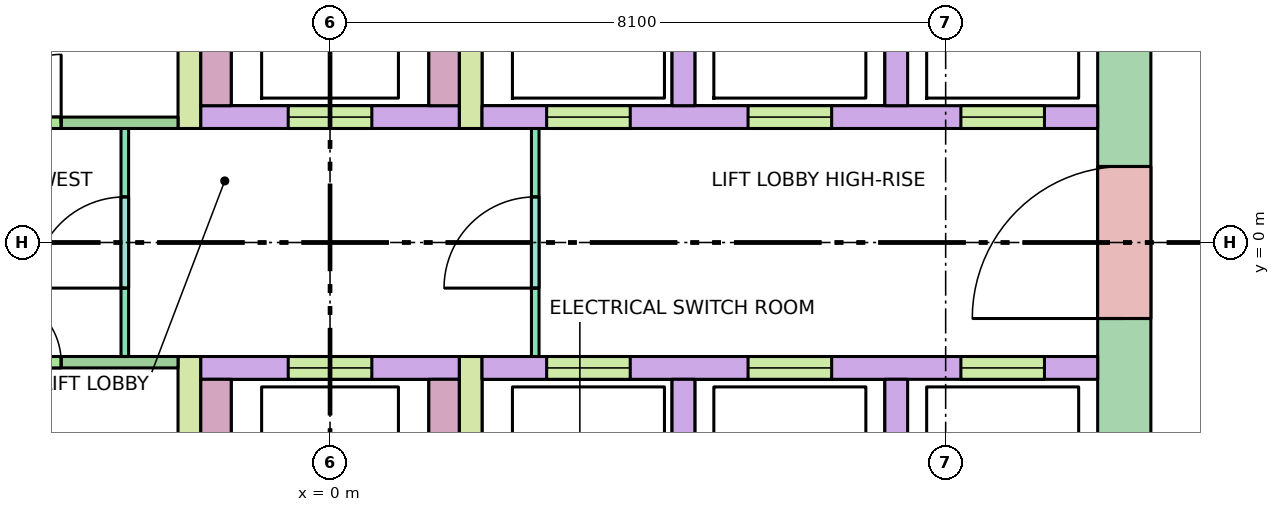
"""IFC4 building model, lengths in metres.
Left out: names, types, materials, properties, quantities, classifications, styles, units other than length and angle.
Written with IfcOpenShell. Run it as: python <this file> out.ifc"""

import sys

from ifc_helpers import new_model, si_unit, direction, frame, frame_2d, origin, place, context, subcontext, project, spatial, rectangle, extrude, element, fill, save


model = new_model("IFC4")
c1 = context("Model", 3, precision=1e-05, world=origin(), true_north=direction((0.0, 1.0)))
c2 = subcontext(c1, "Body", "Model", "MODEL_VIEW")
j1 = project(units=[si_unit("LENGTHUNIT", "METRE"), si_unit("PLANEANGLEUNIT", "RADIAN")], contexts=[c1])
p1 = place(None, origin())
s1 = spatial("IfcSite", under=j1, at=p1, CompositionType="ELEMENT")
p2 = place(p1, origin())
s2 = spatial("IfcBuilding", under=s1, at=p2, CompositionType="ELEMENT")
p3 = place(p2, frame((0.0, 0.0, 248.3)))
s3 = spatial("IfcBuildingStorey", under=s2, at=p3, CompositionType="ELEMENT", Elevation=248.3)
p4 = place(p3, frame((10.45, -5.13, -0.28), z_axis=(0.0, 0.0, 1.0), x_axis=(0.0, 1.0, 0.0)))
e1 = element("IfcWall", 1, at=p4, inside=s3, PredefinedType="SHEAR", context=c2, shape_type="SweptSolid", body=[
    extrude(rectangle(XDim=10.26, YDim=0.7, at=frame_2d((5.13, 0.0))), origin(), (0.0, 0.0, 1.0), 5.5),
])
p5 = place(p4, frame((4.13, 0.0, 0.28)))
e2 = element("IfcOpeningElement", 2, at=p5, cuts=e1, PredefinedType="OPENING", context=c2, shape_type="SweptSolid", body=[
    extrude(rectangle(XDim=2.0, YDim=2.1, at=frame_2d((1.0, 1.05))), frame((0.0, 0.36, 0.0), z_axis=(0.0, -1.0, 0.0), x_axis=(1.0, 0.0, 0.0)), (0.0, 0.0, 1.0), 0.72),
])
p6 = place(p3, frame((2.0, 1.65, 0.0), z_axis=(0.0, 0.0, 1.0), x_axis=(1.0, 0.0, 0.0)))
e3 = element("IfcWall", 3, at=p6, inside=s3, PredefinedType="SOLIDWALL", context=c2, shape_type="SweptSolid", body=[
    extrude(rectangle(XDim=8.1, YDim=0.3, at=frame_2d((4.05, 0.0))), origin(), (0.0, 0.0, 1.0), 5.22),
])
p7 = place(p6, frame((0.85, 0.0, 0.0)))
e4 = element("IfcOpeningElement", 4, at=p7, cuts=e3, PredefinedType="OPENING", context=c2, shape_type="SweptSolid", body=[
    extrude(rectangle(XDim=1.1, YDim=2.1, at=frame_2d((0.55, 1.05))), frame((0.0, 0.16, 0.0), z_axis=(0.0, -1.0, 0.0), x_axis=(1.0, 0.0, 0.0)), (0.0, 0.0, 1.0), 0.32),
])
p8 = place(p6, frame((3.5, 0.0, 0.0)))
e5 = element("IfcOpeningElement", 5, at=p8, cuts=e3, PredefinedType="OPENING", context=c2, shape_type="SweptSolid", body=[
    extrude(rectangle(XDim=1.1, YDim=2.1, at=frame_2d((0.55, 1.05))), frame((0.0, 0.16, 0.0), z_axis=(0.0, -1.0, 0.0), x_axis=(1.0, 0.0, 0.0)), (0.0, 0.0, 1.0), 0.32),
])
p9 = place(p6, frame((6.3, 0.0, 0.0)))
e6 = element("IfcOpeningElement", 6, at=p9, cuts=e3, PredefinedType="OPENING", context=c2, shape_type="SweptSolid", body=[
    extrude(rectangle(XDim=1.1, YDim=2.1, at=frame_2d((0.55, 1.05))), frame((0.0, 0.16, 0.0), z_axis=(0.0, -1.0, 0.0), x_axis=(1.0, 0.0, 0.0)), (0.0, 0.0, 1.0), 0.32),
])
p10 = place(p3, frame((2.0, -1.65, 0.0), z_axis=(0.0, 0.0, 1.0), x_axis=(1.0, 0.0, 0.0)))
e7 = element("IfcWall", 7, at=p10, inside=s3, PredefinedType="SOLIDWALL", context=c2, shape_type="SweptSolid", body=[
    extrude(rectangle(XDim=8.1, YDim=0.3, at=frame_2d((4.05, 0.0))), origin(), (0.0, 0.0, 1.0), 5.22),
])
p11 = place(p10, frame((0.85, 0.0, 0.0)))
e8 = element("IfcOpeningElement", 8, at=p11, cuts=e7, PredefinedType="OPENING", context=c2, shape_type="SweptSolid", body=[
    extrude(rectangle(XDim=1.1, YDim=2.1, at=frame_2d((0.55, 1.05))), frame((0.0, 0.16, 0.0), z_axis=(0.0, -1.0, 0.0), x_axis=(1.0, 0.0, 0.0)), (0.0, 0.0, 1.0), 0.32),
])
p12 = place(p10, frame((3.5, 0.0, 0.0)))
e9 = element("IfcOpeningElement", 9, at=p12, cuts=e7, PredefinedType="OPENING", context=c2, shape_type="SweptSolid", body=[
    extrude(rectangle(XDim=1.1, YDim=2.1, at=frame_2d((0.55, 1.05))), frame((0.0, 0.16, 0.0), z_axis=(0.0, -1.0, 0.0), x_axis=(1.0, 0.0, 0.0)), (0.0, 0.0, 1.0), 0.32),
])
p13 = place(p10, frame((6.3, 0.0, 0.0)))
e10 = element("IfcOpeningElement", 10, at=p13, cuts=e7, PredefinedType="OPENING", context=c2, shape_type="SweptSolid", body=[
    extrude(rectangle(XDim=1.1, YDim=2.1, at=frame_2d((0.55, 1.05))), frame((0.0, 0.16, 0.0), z_axis=(0.0, -1.0, 0.0), x_axis=(1.0, 0.0, 0.0)), (0.0, 0.0, 1.0), 0.32),
])
for number, where, z_axis, x_axis in (
    (11, (4.65, 1.8, 0.0), (0.0, 0.0, 1.0), (0.0, 1.0, 0.0)),
    (12, (4.65, -4.2, 0.0), (0.0, 0.0, 1.0), (0.0, 1.0, 0.0)),
    (13, (7.45, 1.8, 0.0), (0.0, 0.0, 1.0), (0.0, 1.0, 0.0)),
    (14, (7.45, -4.2, 0.0), (0.0, 0.0, 1.0), (0.0, 1.0, 0.0)),
):
    element("IfcWall", number, at=place(p3, frame(where, z_axis=z_axis, x_axis=x_axis)), inside=s3, PredefinedType="SOLIDWALL", context=c2, shape_type="SweptSolid", body=[
        extrude(rectangle(XDim=2.4, YDim=0.3, at=frame_2d((1.2, 0.0))), origin(), (0.0, 0.0, 1.0), 5.22),
    ])
for number, where, z_axis, x_axis in (
    (15, (-1.85, 1.5, 0.0), (0.0, 0.0, 1.0), (0.0, 1.0, 0.0)),
    (16, (-1.85, -8.1, 0.0), (0.0, 0.0, 1.0), (0.0, 1.0, 0.0)),
    (17, (1.85, 1.5, 0.0), (0.0, 0.0, 1.0), (0.0, 1.0, 0.0)),
    (18, (1.85, -8.1, 0.0), (0.0, 0.0, 1.0), (0.0, 1.0, 0.0)),
):
    element("IfcWall", number, at=place(p3, frame(where, z_axis=z_axis, x_axis=x_axis)), inside=s3, PredefinedType="SHEAR", context=c2, shape_type="SweptSolid", body=[
        extrude(rectangle(XDim=6.6, YDim=0.3, at=frame_2d((3.3, 0.0))), origin(), (0.0, 0.0, 1.0), 5.22),
    ])
p14 = place(p3, frame((-1.7, 1.65, 0.0), z_axis=(0.0, 0.0, 1.0), x_axis=(1.0, 0.0, 0.0)))
e19 = element("IfcWall", 19, at=p14, inside=s3, PredefinedType="SOLIDWALL", context=c2, shape_type="SweptSolid", body=[
    extrude(rectangle(XDim=3.4, YDim=0.3, at=frame_2d((1.7, 0.0))), origin(), (0.0, 0.0, 1.0), 5.22),
])
p15 = place(p14, frame((1.15, 0.0, 0.0)))
e20 = element("IfcOpeningElement", 20, at=p15, cuts=e19, PredefinedType="OPENING", context=c2, shape_type="SweptSolid", body=[
    extrude(rectangle(XDim=1.1, YDim=2.1, at=frame_2d((0.55, 1.05))), frame((0.0, 0.16, 0.0), z_axis=(0.0, -1.0, 0.0), x_axis=(1.0, 0.0, 0.0)), (0.0, 0.0, 1.0), 0.32),
])
p16 = place(p3, frame((-1.7, -1.65, 0.0), z_axis=(0.0, 0.0, 1.0), x_axis=(1.0, 0.0, 0.0)))
e21 = element("IfcWall", 21, at=p16, inside=s3, PredefinedType="SOLIDWALL", context=c2, shape_type="SweptSolid", body=[
    extrude(rectangle(XDim=3.4, YDim=0.3, at=frame_2d((1.7, 0.0))), origin(), (0.0, 0.0, 1.0), 5.22),
])
p17 = place(p16, frame((1.15, 0.0, 0.0)))
e22 = element("IfcOpeningElement", 22, at=p17, cuts=e21, PredefinedType="OPENING", context=c2, shape_type="SweptSolid", body=[
    extrude(rectangle(XDim=1.1, YDim=2.1, at=frame_2d((0.55, 1.05))), frame((0.0, 0.16, 0.0), z_axis=(0.0, -1.0, 0.0), x_axis=(1.0, 0.0, 0.0)), (0.0, 0.0, 1.0), 0.32),
])
for number, where, z_axis, x_axis in (
    (23, (-1.5, 1.8, 0.0), (0.0, 0.0, 1.0), (0.0, 1.0, 0.0)),
    (24, (-1.5, -4.8, 0.0), (0.0, 0.0, 1.0), (0.0, 1.0, 0.0)),
    (25, (1.5, 1.8, 0.0), (0.0, 0.0, 1.0), (0.0, 1.0, 0.0)),
    (26, (1.5, -4.8, 0.0), (0.0, 0.0, 1.0), (0.0, 1.0, 0.0)),
):
    element("IfcWall", number, at=place(p3, frame(where, z_axis=z_axis, x_axis=x_axis)), inside=s3, PredefinedType="SOLIDWALL", context=c2, shape_type="SweptSolid", body=[
        extrude(rectangle(XDim=3.0, YDim=0.4, at=frame_2d((1.5, 0.0))), origin(), (0.0, 0.0, 1.0), 5.22),
    ])
p18 = place(p3, frame((-2.7, -1.5, 0.0), z_axis=(0.0, 0.0, 1.0), x_axis=(0.0, 1.0, 0.0)))
e27 = element("IfcWall", 27, at=p18, inside=s3, PredefinedType="PARTITIONING", context=c2, shape_type="SweptSolid", body=[
    extrude(rectangle(XDim=3.0, YDim=0.1, at=frame_2d((1.5, 0.0))), origin(), (0.0, 0.0, 1.0), 5.22),
])
p19 = place(p18, frame((0.9, 0.0, 0.0)))
e28 = element("IfcOpeningElement", 28, at=p19, cuts=e27, PredefinedType="OPENING", context=c2, shape_type="SweptSolid", body=[
    extrude(rectangle(XDim=1.2, YDim=2.1, at=frame_2d((0.6, 1.05))), frame((0.0, 0.06, 0.0), z_axis=(0.0, -1.0, 0.0), x_axis=(1.0, 0.0, 0.0)), (0.0, 0.0, 1.0), 0.12),
])
p20 = place(p3, frame((2.7, -1.5, 0.0), z_axis=(0.0, 0.0, 1.0), x_axis=(0.0, 1.0, 0.0)))
e29 = element("IfcWall", 29, at=p20, inside=s3, PredefinedType="PARTITIONING", context=c2, shape_type="SweptSolid", body=[
    extrude(rectangle(XDim=3.0, YDim=0.1, at=frame_2d((1.5, 0.0))), origin(), (0.0, 0.0, 1.0), 5.22),
])
p21 = place(p20, frame((0.9, 0.0, 0.0)))
e30 = element("IfcOpeningElement", 30, at=p21, cuts=e29, PredefinedType="OPENING", context=c2, shape_type="SweptSolid", body=[
    extrude(rectangle(XDim=1.2, YDim=2.1, at=frame_2d((0.6, 1.05))), frame((0.0, 0.06, 0.0), z_axis=(0.0, -1.0, 0.0), x_axis=(1.0, 0.0, 0.0)), (0.0, 0.0, 1.0), 0.12),
])
p22 = place(p3, frame((-10.1, 1.575, 0.0), z_axis=(0.0, 0.0, 1.0), x_axis=(1.0, 0.0, 0.0)))
e31 = element("IfcWall", 31, at=p22, inside=s3, PredefinedType="PARTITIONING", context=c2, shape_type="SweptSolid", body=[
    extrude(rectangle(XDim=8.1, YDim=0.15, at=frame_2d((4.05, 0.0))), origin(), (0.0, 0.0, 1.0), 5.22),
])
p23 = place(p22, frame((1.538, 0.0, 0.0)))
e32 = element("IfcOpeningElement", 32, at=p23, cuts=e31, PredefinedType="OPENING", context=c2, shape_type="SweptSolid", body=[
    extrude(rectangle(XDim=0.9, YDim=2.1, at=frame_2d((0.45, 1.05))), frame((0.0, 0.085, 0.0), z_axis=(0.0, -1.0, 0.0), x_axis=(1.0, 0.0, 0.0)), (0.0, 0.0, 1.0), 0.17),
])
p24 = place(p22, frame((5.663, 0.0, 0.0)))
e33 = element("IfcOpeningElement", 33, at=p24, cuts=e31, PredefinedType="OPENING", context=c2, shape_type="SweptSolid", body=[
    extrude(rectangle(XDim=0.9, YDim=2.1, at=frame_2d((0.45, 1.05))), frame((0.0, 0.085, 0.0), z_axis=(0.0, -1.0, 0.0), x_axis=(1.0, 0.0, 0.0)), (0.0, 0.0, 1.0), 0.17),
])
p25 = place(p3, frame((-10.1, -1.575, 0.0), z_axis=(0.0, 0.0, 1.0), x_axis=(1.0, 0.0, 0.0)))
e34 = element("IfcWall", 34, at=p25, inside=s3, PredefinedType="PARTITIONING", context=c2, shape_type="SweptSolid", body=[
    extrude(rectangle(XDim=8.1, YDim=0.15, at=frame_2d((4.05, 0.0))), origin(), (0.0, 0.0, 1.0), 5.22),
])
p26 = place(p25, frame((1.538, 0.0, 0.0)))
e35 = element("IfcOpeningElement", 35, at=p26, cuts=e34, PredefinedType="OPENING", context=c2, shape_type="SweptSolid", body=[
    extrude(rectangle(XDim=0.9, YDim=2.1, at=frame_2d((0.45, 1.05))), frame((0.0, 0.085, 0.0), z_axis=(0.0, -1.0, 0.0), x_axis=(1.0, 0.0, 0.0)), (0.0, 0.0, 1.0), 0.17),
])
p27 = place(p25, frame((5.663, 0.0, 0.0)))
e36 = element("IfcOpeningElement", 36, at=p27, cuts=e34, PredefinedType="OPENING", context=c2, shape_type="SweptSolid", body=[
    extrude(rectangle(XDim=0.9, YDim=2.1, at=frame_2d((0.45, 1.05))), frame((0.0, 0.085, 0.0), z_axis=(0.0, -1.0, 0.0), x_axis=(1.0, 0.0, 0.0)), (0.0, 0.0, 1.0), 0.17),
])
p28 = place(p7, origin())
e37 = element("IfcDoor", 37, at=p28, inside=s3, OperationType="DOUBLE_DOOR_SLIDING", PredefinedType="DOOR", context=c2, shape_type="SweptSolid", body=[
    extrude(rectangle(XDim=1.1, YDim=2.1, at=frame_2d((0.55, 1.05))), frame((0.0, 0.025, 0.0), z_axis=(0.0, -1.0, 0.0), x_axis=(1.0, 0.0, 0.0)), (0.0, 0.0, 1.0), 0.05),
])
fill(e4, e37)
p29 = place(p8, origin())
e38 = element("IfcDoor", 38, at=p29, inside=s3, OperationType="DOUBLE_DOOR_SLIDING", PredefinedType="DOOR", context=c2, shape_type="SweptSolid", body=[
    extrude(rectangle(XDim=1.1, YDim=2.1, at=frame_2d((0.55, 1.05))), frame((0.0, 0.025, 0.0), z_axis=(0.0, -1.0, 0.0), x_axis=(1.0, 0.0, 0.0)), (0.0, 0.0, 1.0), 0.05),
])
fill(e5, e38)
p30 = place(p9, origin())
e39 = element("IfcDoor", 39, at=p30, inside=s3, OperationType="DOUBLE_DOOR_SLIDING", PredefinedType="DOOR", context=c2, shape_type="SweptSolid", body=[
    extrude(rectangle(XDim=1.1, YDim=2.1, at=frame_2d((0.55, 1.05))), frame((0.0, 0.025, 0.0), z_axis=(0.0, -1.0, 0.0), x_axis=(1.0, 0.0, 0.0)), (0.0, 0.0, 1.0), 0.05),
])
fill(e6, e39)
p31 = place(p11, origin())
e40 = element("IfcDoor", 40, at=p31, inside=s3, OperationType="DOUBLE_DOOR_SLIDING", PredefinedType="DOOR", context=c2, shape_type="SweptSolid", body=[
    extrude(rectangle(XDim=1.1, YDim=2.1, at=frame_2d((0.55, 1.05))), frame((0.0, 0.025, 0.0), z_axis=(0.0, -1.0, 0.0), x_axis=(1.0, 0.0, 0.0)), (0.0, 0.0, 1.0), 0.05),
])
fill(e8, e40)
p32 = place(p12, origin())
e41 = element("IfcDoor", 41, at=p32, inside=s3, OperationType="DOUBLE_DOOR_SLIDING", PredefinedType="DOOR", context=c2, shape_type="SweptSolid", body=[
    extrude(rectangle(XDim=1.1, YDim=2.1, at=frame_2d((0.55, 1.05))), frame((0.0, 0.025, 0.0), z_axis=(0.0, -1.0, 0.0), x_axis=(1.0, 0.0, 0.0)), (0.0, 0.0, 1.0), 0.05),
])
fill(e9, e41)
p33 = place(p13, origin())
e42 = element("IfcDoor", 42, at=p33, inside=s3, OperationType="DOUBLE_DOOR_SLIDING", PredefinedType="DOOR", context=c2, shape_type="SweptSolid", body=[
    extrude(rectangle(XDim=1.1, YDim=2.1, at=frame_2d((0.55, 1.05))), frame((0.0, 0.025, 0.0), z_axis=(0.0, -1.0, 0.0), x_axis=(1.0, 0.0, 0.0)), (0.0, 0.0, 1.0), 0.05),
])
fill(e10, e42)
p34 = place(p15, origin())
e43 = element("IfcDoor", 43, at=p34, inside=s3, OperationType="DOUBLE_DOOR_SLIDING", PredefinedType="DOOR", context=c2, shape_type="SweptSolid", body=[
    extrude(rectangle(XDim=1.1, YDim=2.1, at=frame_2d((0.55, 1.05))), frame((0.0, 0.025, 0.0), z_axis=(0.0, -1.0, 0.0), x_axis=(1.0, 0.0, 0.0)), (0.0, 0.0, 1.0), 0.05),
])
fill(e20, e43)
p35 = place(p17, origin())
e44 = element("IfcDoor", 44, at=p35, inside=s3, OperationType="DOUBLE_DOOR_SLIDING", PredefinedType="DOOR", context=c2, shape_type="SweptSolid", body=[
    extrude(rectangle(XDim=1.1, YDim=2.1, at=frame_2d((0.55, 1.05))), frame((0.0, 0.025, 0.0), z_axis=(0.0, -1.0, 0.0), x_axis=(1.0, 0.0, 0.0)), (0.0, 0.0, 1.0), 0.05),
])
fill(e22, e44)
p36 = place(p5, origin())
e45 = element("IfcDoor", 45, at=p36, inside=s3, OperationType="DOUBLE_DOOR_SINGLE_SWING", PredefinedType="DOOR", context=c2, shape_type="SweptSolid", body=[
    extrude(rectangle(XDim=2.0, YDim=2.1, at=frame_2d((1.0, 1.05))), frame((0.0, 0.025, 0.0), z_axis=(0.0, -1.0, 0.0), x_axis=(1.0, 0.0, 0.0)), (0.0, 0.0, 1.0), 0.05),
])
fill(e2, e45)
p37 = place(p19, origin())
e46 = element("IfcDoor", 46, at=p37, inside=s3, OperationType="SINGLE_SWING_LEFT", PredefinedType="DOOR", context=c2, shape_type="SweptSolid", body=[
    extrude(rectangle(XDim=1.2, YDim=2.1, at=frame_2d((0.6, 1.05))), frame((0.0, 0.025, 0.0), z_axis=(0.0, -1.0, 0.0), x_axis=(1.0, 0.0, 0.0)), (0.0, 0.0, 1.0), 0.05),
])
fill(e28, e46)
p38 = place(p21, origin())
e47 = element("IfcDoor", 47, at=p38, inside=s3, OperationType="SINGLE_SWING_LEFT", PredefinedType="DOOR", context=c2, shape_type="SweptSolid", body=[
    extrude(rectangle(XDim=1.2, YDim=2.1, at=frame_2d((0.6, 1.05))), frame((0.0, 0.025, 0.0), z_axis=(0.0, -1.0, 0.0), x_axis=(1.0, 0.0, 0.0)), (0.0, 0.0, 1.0), 0.05),
])
fill(e30, e47)
p39 = place(p24, origin())
e48 = element("IfcDoor", 48, at=p39, inside=s3, OperationType="SINGLE_SWING_RIGHT", PredefinedType="DOOR", context=c2, shape_type="SweptSolid", body=[
    extrude(rectangle(XDim=0.9, YDim=2.1, at=frame_2d((0.45, 1.05))), frame((0.0, 0.025, 0.0), z_axis=(0.0, -1.0, 0.0), x_axis=(1.0, 0.0, 0.0)), (0.0, 0.0, 1.0), 0.05),
])
fill(e33, e48)
p40 = place(p27, origin())
e49 = element("IfcDoor", 49, at=p40, inside=s3, OperationType="SINGLE_SWING_LEFT", PredefinedType="DOOR", context=c2, shape_type="SweptSolid", body=[
    extrude(rectangle(XDim=0.9, YDim=2.1, at=frame_2d((0.45, 1.05))), frame((0.0, 0.025, 0.0), z_axis=(0.0, -1.0, 0.0), x_axis=(1.0, 0.0, 0.0)), (0.0, 0.0, 1.0), 0.05),
])
fill(e36, e49)
save(model, sys.argv[1])
